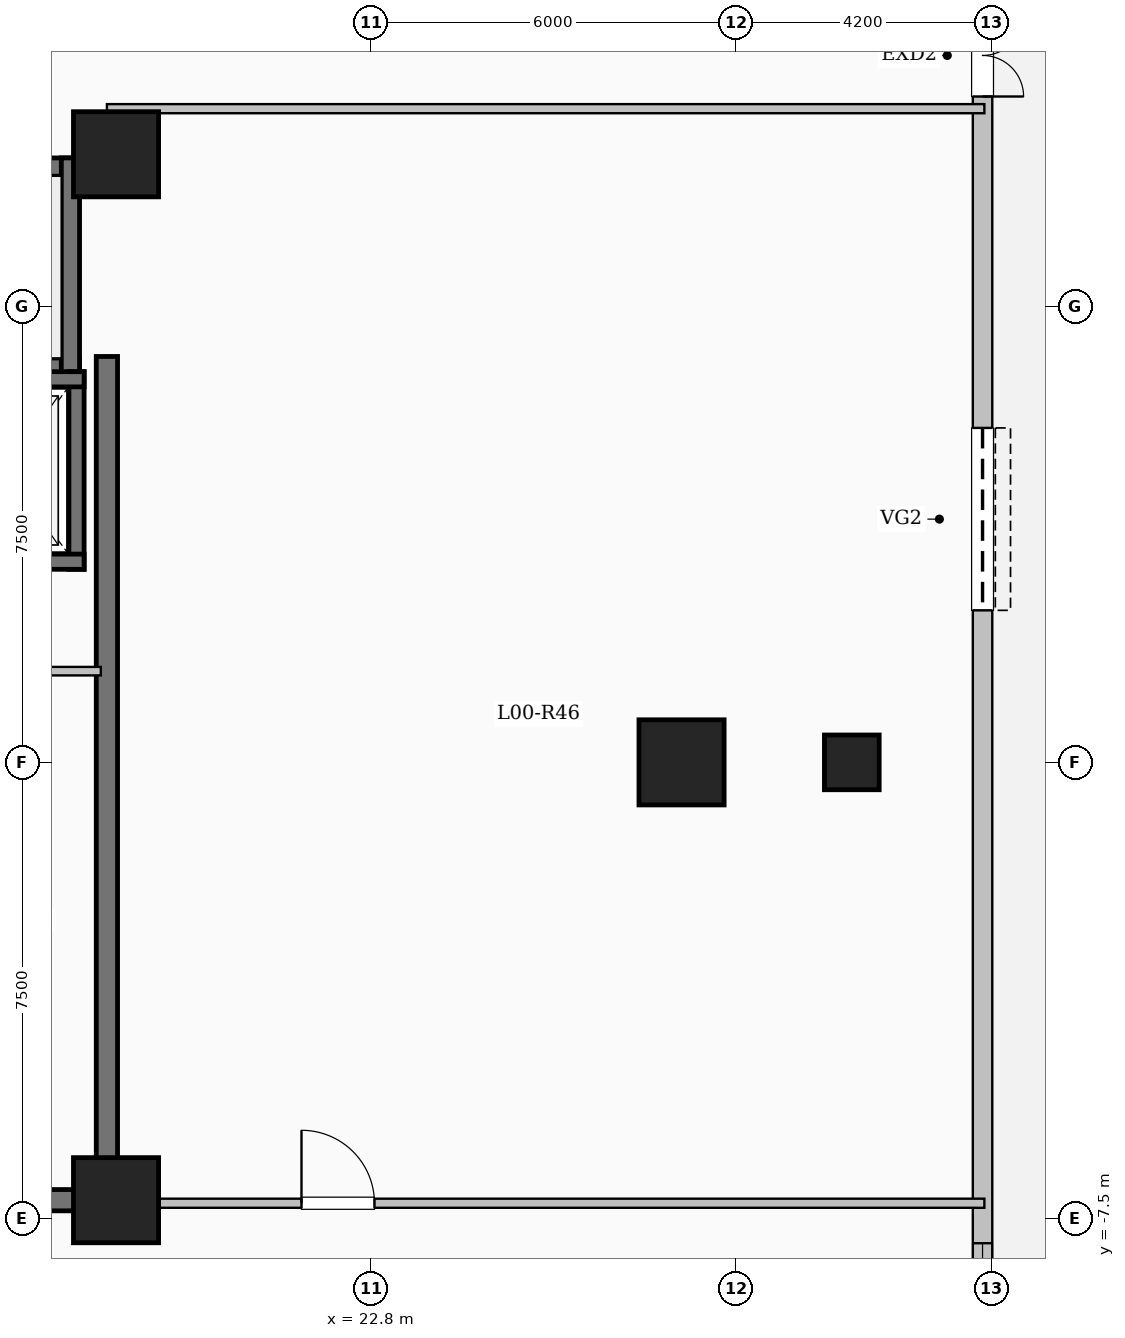
"""IFC4 building model, lengths in metres.
Left out: names, types, materials, properties, quantities, classifications, styles, units other than length and angle.
Written with IfcOpenShell. Run it as: python <this file> out.ifc"""

import sys

from ifc_helpers import new_model, si_unit, direction, frame, frame_2d, origin, origin_2d, place, context, subcontext, project, spatial, rectangle, extrude, element, fill, save


model = new_model("IFC4")
c1 = context("Model", 3, precision=1e-05, world=origin(), true_north=direction((0.0, 1.0)))
c2 = subcontext(c1, "Body", "Model", "MODEL_VIEW")
j1 = project(units=[si_unit("LENGTHUNIT", "METRE"), si_unit("PLANEANGLEUNIT", "RADIAN")], contexts=[c1])
p1 = place(None, origin())
s1 = spatial("IfcSite", under=j1, at=p1, CompositionType="ELEMENT")
p2 = place(p1, origin())
s2 = spatial("IfcBuilding", under=s1, at=p2, CompositionType="ELEMENT")
p3 = place(p2, origin())
s3 = spatial("IfcBuildingStorey", under=s2, at=p3, CompositionType="ELEMENT", Elevation=0.0)
for number, where, z_axis, x_axis in (
    (1, (18.6, -7.2, 0.0), (0.0, 0.0, 1.0), (1.0, 0.0, 0.0)),
    (2, (18.6, 10.0, 0.0), (0.0, 0.0, 1.0), (1.0, 0.0, 0.0)),
):
    element("IfcColumn", number, at=place(p3, frame(where, z_axis=z_axis, x_axis=x_axis)), inside=s3, PredefinedType="COLUMN", context=c2, shape_type="SweptSolid", body=[
        extrude(rectangle(XDim=1.4, YDim=1.4, at=origin_2d()), origin(), (0.0, 0.0, 1.0), 5.4),
    ])
p4 = place(p3, frame((30.7, 0.0, 0.0), z_axis=(0.0, 0.0, 1.0), x_axis=(1.0, 0.0, 0.0)))
e3 = element("IfcColumn", 3, at=p4, inside=s3, PredefinedType="COLUMN", context=c2, shape_type="SweptSolid", body=[
    extrude(rectangle(XDim=0.9, YDim=0.9, at=origin_2d()), origin(), (0.0, 0.0, 1.0), 5.4),
])
p5 = place(p3, frame((27.9, 0.0, 0.0), z_axis=(0.0, 0.0, 1.0), x_axis=(1.0, 0.0, 0.0)))
e4 = element("IfcColumn", 4, at=p5, inside=s3, PredefinedType="COLUMN", context=c2, shape_type="SweptSolid", body=[
    extrude(rectangle(XDim=1.4, YDim=1.4, at=origin_2d()), origin(), (0.0, 0.0, 1.0), 5.4),
])
p6 = place(p3, frame((32.85, 29.85, 0.0), z_axis=(0.0, 0.0, 1.0), x_axis=(0.0, -1.0, 0.0)))
e5 = element("IfcWall", 5, at=p6, inside=s3, PredefinedType="SOLIDWALL", context=c2, shape_type="SweptSolid", body=[
    extrude(rectangle(XDim=59.7, YDim=0.32, at=frame_2d((29.85, 0.0))), origin(), (0.0, 0.0, 1.0), 5.1),
])
p7 = place(p6, frame((17.55, 0.0, 0.0)))
e6 = element("IfcOpeningElement", 6, at=p7, cuts=e5, PredefinedType="OPENING", context=c2, shape_type="SweptSolid", body=[
    extrude(rectangle(XDim=1.35, YDim=2.2, at=frame_2d((0.675, 1.1))), frame((0.0, 0.17, 0.0), z_axis=(0.0, -1.0, 0.0), x_axis=(1.0, 0.0, 0.0)), (0.0, 0.0, 1.0), 0.34),
])
p8 = place(p6, frame((46.65, 0.0, 0.0)))
e7 = element("IfcOpeningElement", 7, at=p8, cuts=e5, PredefinedType="OPENING", context=c2, shape_type="SweptSolid", body=[
    extrude(rectangle(XDim=2.0, YDim=2.4, at=frame_2d((1.0, 1.2))), frame((0.0, 0.17, 0.0), z_axis=(0.0, -1.0, 0.0), x_axis=(1.0, 0.0, 0.0)), (0.0, 0.0, 1.0), 0.34),
])
p9 = place(p6, frame((24.35, 0.0, 0.0)))
e8 = element("IfcOpeningElement", 8, at=p9, cuts=e5, PredefinedType="OPENING", context=c2, shape_type="SweptSolid", body=[
    extrude(rectangle(XDim=3.0, YDim=2.8, at=frame_2d((1.5, 1.4))), frame((0.0, 0.17, 0.0), z_axis=(0.0, -1.0, 0.0), x_axis=(1.0, 0.0, 0.0)), (0.0, 0.0, 1.0), 0.34),
])
p10 = place(p6, frame((7.6, 0.0, 0.9)))
e9 = element("IfcOpeningElement", 9, at=p10, cuts=e5, PredefinedType="OPENING", context=c2, shape_type="SweptSolid", body=[
    extrude(rectangle(XDim=2.1, YDim=2.0, at=frame_2d((1.05, 1.0))), frame((0.0, 0.17, 0.0), z_axis=(0.0, -1.0, 0.0), x_axis=(1.0, 0.0, 0.0)), (0.0, 0.0, 1.0), 0.34),
])
p11 = place(p6, frame((37.758, 0.0, 0.9)))
e10 = element("IfcOpeningElement", 10, at=p11, cuts=e5, PredefinedType="OPENING", context=c2, shape_type="SweptSolid", body=[
    extrude(rectangle(XDim=1.7, YDim=1.9, at=frame_2d((0.85, 0.95))), frame((0.0, 0.17, 0.0), z_axis=(0.0, -1.0, 0.0), x_axis=(1.0, 0.0, 0.0)), (0.0, 0.0, 1.0), 0.34),
])
p12 = place(p6, frame((42.415, 0.0, 0.9)))
e11 = element("IfcOpeningElement", 11, at=p12, cuts=e5, PredefinedType="OPENING", context=c2, shape_type="SweptSolid", body=[
    extrude(rectangle(XDim=2.1, YDim=2.0, at=frame_2d((1.05, 1.0))), frame((0.0, 0.17, 0.0), z_axis=(0.0, -1.0, 0.0), x_axis=(1.0, 0.0, 0.0)), (0.0, 0.0, 1.0), 0.34),
])
p13 = place(p6, frame((55.2, 0.0, 0.9)))
e12 = element("IfcOpeningElement", 12, at=p13, cuts=e5, PredefinedType="OPENING", context=c2, shape_type="SweptSolid", body=[
    extrude(rectangle(XDim=2.1, YDim=2.0, at=frame_2d((1.05, 1.0))), frame((0.0, 0.17, 0.0), z_axis=(0.0, -1.0, 0.0), x_axis=(1.0, 0.0, 0.0)), (0.0, 0.0, 1.0), 0.34),
])
p14 = place(p3, frame((10.0, 9.79, 0.0), z_axis=(0.0, 0.0, 1.0), x_axis=(1.0, 0.0, 0.0)))
e13 = element("IfcWall", 13, at=p14, inside=s3, PredefinedType="SHEAR", context=c2, shape_type="SweptSolid", body=[
    extrude(rectangle(XDim=8.0, YDim=0.3, at=frame_2d((4.0, 0.0))), origin(), (0.0, 0.0, 1.0), 5.4),
])
p15 = place(p14, frame((0.33, 0.0, 0.0)))
e14 = element("IfcOpeningElement", 14, at=p15, cuts=e13, PredefinedType="OPENING", context=c2, shape_type="SweptSolid", body=[
    extrude(rectangle(XDim=0.9, YDim=2.15, at=frame_2d((0.45, 1.075))), frame((0.0, 0.16, 0.0), z_axis=(0.0, -1.0, 0.0), x_axis=(1.0, 0.0, 0.0)), (0.0, 0.0, 1.0), 0.32),
])
p16 = place(p3, frame((10.0, 6.5, 0.0), z_axis=(0.0, 0.0, 1.0), x_axis=(1.0, 0.0, 0.0)))
e15 = element("IfcWall", 15, at=p16, inside=s3, PredefinedType="SHEAR", context=c2, shape_type="SweptSolid", body=[
    extrude(rectangle(XDim=8.0, YDim=0.3, at=frame_2d((4.0, 0.0))), origin(), (0.0, 0.0, 1.0), 5.4),
])
p17 = place(p16, frame((0.55, 0.0, 0.0)))
e16 = element("IfcOpeningElement", 16, at=p17, cuts=e15, PredefinedType="OPENING", context=c2, shape_type="SweptSolid", body=[
    extrude(rectangle(XDim=1.0, YDim=2.15, at=frame_2d((0.5, 1.075))), frame((0.0, 0.16, 0.0), z_axis=(0.0, -1.0, 0.0), x_axis=(1.0, 0.0, 0.0)), (0.0, 0.0, 1.0), 0.32),
])
p18 = place(p3, frame((17.85, 6.35, 0.0), z_axis=(0.0, 0.0, 1.0), x_axis=(0.0, 1.0, 0.0)))
e17 = element("IfcWall", 17, at=p18, inside=s3, PredefinedType="SHEAR", context=c2, shape_type="SweptSolid", body=[
    extrude(rectangle(XDim=3.59, YDim=0.3, at=frame_2d((1.795, 0.0))), origin(), (0.0, 0.0, 1.0), 5.4),
])
p19 = place(p3, frame((17.95, 3.175, 0.0), z_axis=(0.0, 0.0, 1.0), x_axis=(0.0, 1.0, 0.0)))
e18 = element("IfcWall", 18, at=p19, inside=s3, PredefinedType="SHEAR", context=c2, shape_type="SweptSolid", body=[
    extrude(rectangle(XDim=3.25, YDim=0.25, at=frame_2d((1.625, 0.0))), origin(), (0.0, 0.0, 1.0), 5.4),
])
for number, where, z_axis, x_axis in (
    (19, (15.525, 3.3, 0.0), (0.0, 0.0, 1.0), (1.0, 0.0, 0.0)),
    (20, (15.525, 6.3, 0.0), (0.0, 0.0, 1.0), (1.0, 0.0, 0.0)),
):
    element("IfcWall", number, at=place(p3, frame(where, z_axis=z_axis, x_axis=x_axis)), inside=s3, PredefinedType="SHEAR", context=c2, shape_type="SweptSolid", body=[
        extrude(rectangle(XDim=2.55, YDim=0.25, at=frame_2d((1.275, 0.0))), origin(), (0.0, 0.0, 1.0), 5.4),
    ])
p20 = place(p3, frame((18.45, -7.375, 0.0), z_axis=(0.0, 0.0, 1.0), x_axis=(0.0, 1.0, 0.0)))
e21 = element("IfcWall", 21, at=p20, inside=s3, PredefinedType="SHEAR", context=c2, shape_type="SweptSolid", body=[
    extrude(rectangle(XDim=14.05, YDim=0.35, at=frame_2d((7.025, 0.0))), origin(), (0.0, 0.0, 1.0), 5.4),
])
p21 = place(p3, frame((10.075, -7.2, 0.0), z_axis=(0.0, 0.0, 1.0), x_axis=(1.0, 0.0, 0.0)))
e22 = element("IfcWall", 22, at=p21, inside=s3, PredefinedType="SHEAR", context=c2, shape_type="SweptSolid", body=[
    extrude(rectangle(XDim=8.55, YDim=0.35, at=frame_2d((4.275, 0.0))), origin(), (0.0, 0.0, 1.0), 5.4),
])
p22 = place(p21, frame((5.375, 0.0, 0.0)))
e23 = element("IfcOpeningElement", 23, at=p22, cuts=e22, PredefinedType="OPENING", context=c2, shape_type="SweptSolid", body=[
    extrude(rectangle(XDim=1.12, YDim=2.15, at=frame_2d((0.56, 1.075))), frame((0.0, 0.185, 0.0), z_axis=(0.0, -1.0, 0.0), x_axis=(1.0, 0.0, 0.0)), (0.0, 0.0, 1.0), 0.37),
])
p23 = place(p3, frame((15.35, 1.5, 0.0), z_axis=(0.0, 0.0, 1.0), x_axis=(1.0, 0.0, 0.0)))
e24 = element("IfcWall", 24, at=p23, inside=s3, PredefinedType="PARTITIONING", context=c2, shape_type="SweptSolid", body=[
    extrude(rectangle(XDim=3.0, YDim=0.14, at=frame_2d((1.5, 0.0))), origin(), (0.0, 0.0, 1.0), 5.1),
])
p24 = place(p23, frame((0.9, 0.0, 0.0)))
e25 = element("IfcOpeningElement", 25, at=p24, cuts=e24, PredefinedType="OPENING", context=c2, shape_type="SweptSolid", body=[
    extrude(rectangle(XDim=0.9, YDim=2.08, at=frame_2d((0.45, 1.04))), frame((0.0, 0.08, 0.0), z_axis=(0.0, -1.0, 0.0), x_axis=(1.0, 0.0, 0.0)), (0.0, 0.0, 1.0), 0.16),
])
p25 = place(p3, frame((18.45, -7.25, 0.0), z_axis=(0.0, 0.0, 1.0), x_axis=(1.0, 0.0, 0.0)))
e26 = element("IfcWall", 26, at=p25, inside=s3, PredefinedType="PARTITIONING", context=c2, shape_type="SweptSolid", body=[
    extrude(rectangle(XDim=14.43, YDim=0.15, at=frame_2d((7.215, 0.0))), origin(), (0.0, 0.0, 1.0), 5.1),
])
p26 = place(p25, frame((3.2, 0.0, 0.0)))
e27 = element("IfcOpeningElement", 27, at=p26, cuts=e26, PredefinedType="OPENING", context=c2, shape_type="SweptSolid", body=[
    extrude(rectangle(XDim=1.2, YDim=2.2, at=frame_2d((0.6, 1.1))), frame((0.0, 0.085, 0.0), z_axis=(0.0, -1.0, 0.0), x_axis=(1.0, 0.0, 0.0)), (0.0, 0.0, 1.0), 0.17),
])
p27 = place(p3, frame((18.45, 10.75, 0.0), z_axis=(0.0, 0.0, 1.0), x_axis=(1.0, 0.0, 0.0)))
e28 = element("IfcWall", 28, at=p27, inside=s3, PredefinedType="PARTITIONING", context=c2, shape_type="SweptSolid", body=[
    extrude(rectangle(XDim=14.43, YDim=0.15, at=frame_2d((7.215, 0.0))), origin(), (0.0, 0.0, 1.0), 5.1),
])
p28 = place(p7, origin())
e29 = element("IfcDoor", 29, at=p28, inside=s3, OperationType="DOUBLE_DOOR_SINGLE_SWING", PredefinedType="DOOR", context=c2, shape_type="SweptSolid", body=[
    extrude(rectangle(XDim=1.35, YDim=2.2, at=frame_2d((0.675, 1.1))), frame((0.0, 0.025, 0.0), z_axis=(0.0, -1.0, 0.0), x_axis=(1.0, 0.0, 0.0)), (0.0, 0.0, 1.0), 0.05),
])
fill(e6, e29)
p29 = place(p9, origin())
e30 = element("IfcDoor", 30, at=p29, inside=s3, OperationType="ROLLINGUP", PredefinedType="GATE", context=c2, shape_type="SweptSolid", body=[
    extrude(rectangle(XDim=3.0, YDim=2.8, at=frame_2d((1.5, 1.4))), frame((0.0, 0.025, 0.0), z_axis=(0.0, -1.0, 0.0), x_axis=(1.0, 0.0, 0.0)), (0.0, 0.0, 1.0), 0.05),
])
fill(e8, e30)
p30 = place(p11, origin())
e31 = element("IfcWindow", 31, at=p30, inside=s3, PartitioningType="SINGLE_PANEL", PredefinedType="WINDOW", context=c2, shape_type="SweptSolid", body=[
    extrude(rectangle(XDim=1.7, YDim=1.9, at=frame_2d((0.85, 0.95))), frame((0.0, 0.03, 0.0), z_axis=(0.0, -1.0, 0.0), x_axis=(1.0, 0.0, 0.0)), (0.0, 0.0, 1.0), 0.06),
])
fill(e10, e31)
p31 = place(p26, origin())
e32 = element("IfcDoor", 32, at=p31, inside=s3, OperationType="SINGLE_SWING_LEFT", PredefinedType="DOOR", context=c2, shape_type="SweptSolid", body=[
    extrude(rectangle(XDim=1.2, YDim=2.2, at=frame_2d((0.6, 1.1))), frame((0.0, 0.025, 0.0), z_axis=(0.0, -1.0, 0.0), x_axis=(1.0, 0.0, 0.0)), (0.0, 0.0, 1.0), 0.05),
])
fill(e27, e32)
save(model, sys.argv[1])
